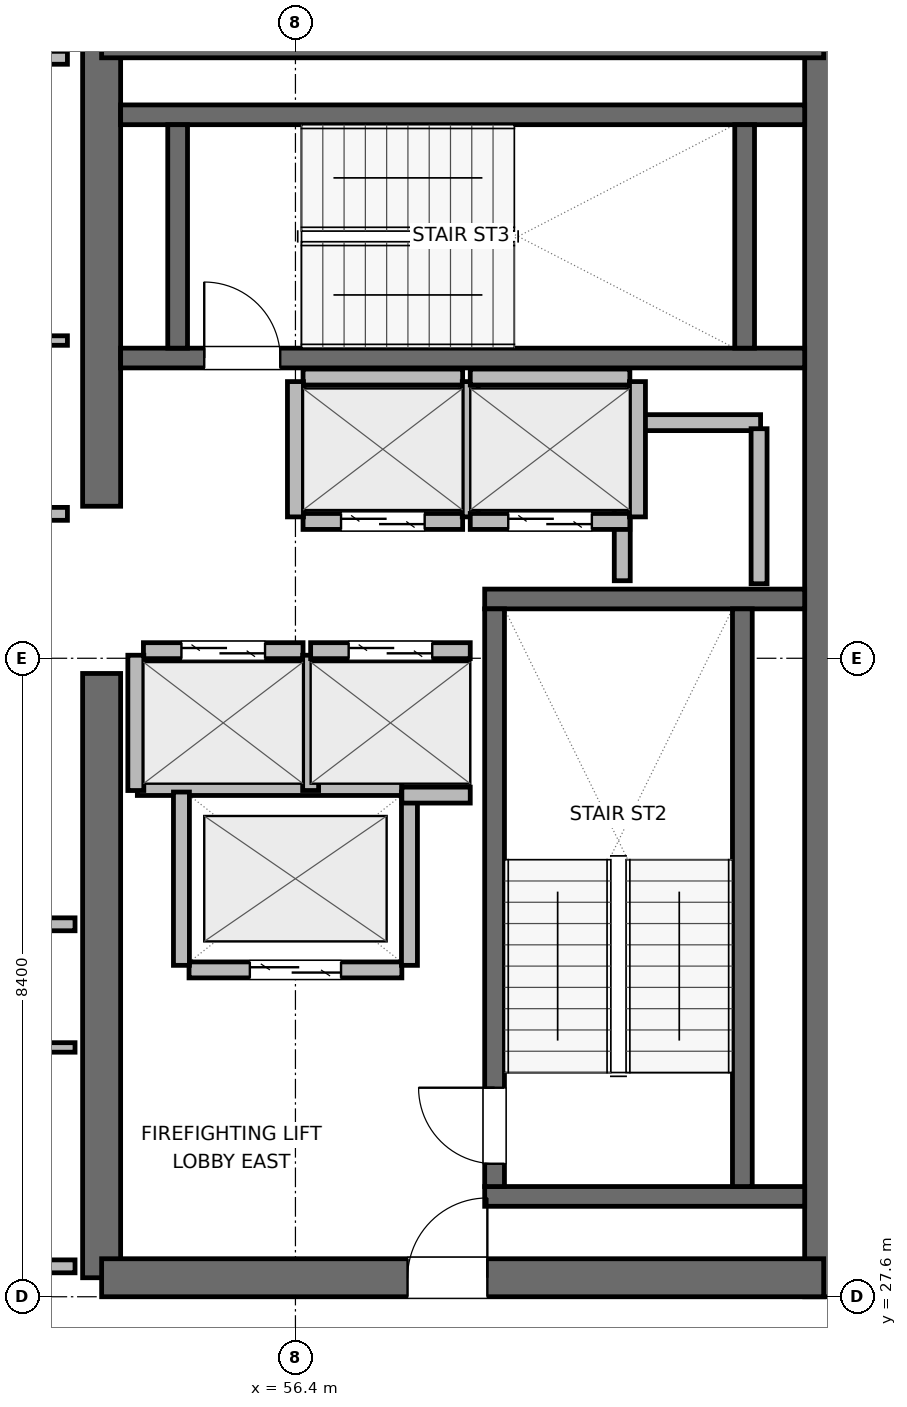
"""IFC4 building model, lengths in metres.
Left out: names, types, materials, properties, quantities, classifications, styles, units other than length and angle.
Written with IfcOpenShell. Run it as: python <this file> out.ifc"""

import sys

from ifc_helpers import new_model, si_unit, direction, frame, frame_2d, origin, place, context, subcontext, project, spatial, rectangle, extrude, element, fill, save


model = new_model("IFC4")
c1 = context("Model", 3, precision=1e-05, world=origin(), true_north=direction((0.0, 1.0)))
c2 = subcontext(c1, "Body", "Model", "MODEL_VIEW")
j1 = project(units=[si_unit("LENGTHUNIT", "METRE"), si_unit("PLANEANGLEUNIT", "RADIAN")], contexts=[c1])
p1 = place(None, origin())
s1 = spatial("IfcSite", under=j1, at=p1, CompositionType="ELEMENT")
p2 = place(p1, origin())
s2 = spatial("IfcBuilding", under=s1, at=p2, CompositionType="ELEMENT")
p3 = place(p2, frame((0.0, 0.0, 325.8)))
s3 = spatial("IfcBuildingStorey", under=s2, at=p3, CompositionType="ELEMENT", Elevation=325.8)
p4 = place(p3, frame((53.85, 27.85, 0.0), z_axis=(0.0, 0.0, 1.0), x_axis=(0.0, 1.0, 0.0)))
e1 = element("IfcWall", 1, at=p4, inside=s3, PredefinedType="SHEAR", context=c2, shape_type="SweptSolid", body=[
    extrude(rectangle(XDim=7.95, YDim=0.5, at=frame_2d((3.975, 0.0))), origin(), (0.0, 0.0, 1.0), 3.9),
])
p5 = place(p3, frame((53.85, 38.0, 0.0), z_axis=(0.0, 0.0, 1.0), x_axis=(0.0, 1.0, 0.0)))
e2 = element("IfcWall", 2, at=p5, inside=s3, PredefinedType="SHEAR", context=c2, shape_type="SweptSolid", body=[
    extrude(rectangle(XDim=6.15, YDim=0.5, at=frame_2d((3.075, 0.0))), origin(), (0.0, 0.0, 1.0), 3.9),
])
p6 = place(p3, frame((63.35, 27.6, 0.0), z_axis=(0.0, 0.0, 1.0), x_axis=(0.0, 1.0, 0.0)))
e3 = element("IfcWall", 3, at=p6, inside=s3, PredefinedType="SHEAR", context=c2, shape_type="SweptSolid", body=[
    extrude(rectangle(XDim=16.8, YDim=0.5, at=frame_2d((8.4, 0.0))), origin(), (0.0, 0.0, 1.0), 3.9),
])
p7 = place(p3, frame((53.85, 27.85, 0.0), z_axis=(0.0, 0.0, 1.0), x_axis=(1.0, 0.0, 0.0)))
e4 = element("IfcWall", 4, at=p7, inside=s3, PredefinedType="SHEAR", context=c2, shape_type="SweptSolid", body=[
    extrude(rectangle(XDim=9.5, YDim=0.5, at=frame_2d((4.75, 0.0))), origin(), (0.0, 0.0, 1.0), 3.9),
])
p8 = place(p7, frame((4.025, 0.0, 0.0)))
e5 = element("IfcOpeningElement", 5, at=p8, cuts=e4, PredefinedType="OPENING", context=c2, shape_type="SweptSolid", body=[
    extrude(rectangle(XDim=1.05, YDim=2.04, at=frame_2d((0.525, 1.02))), frame((0.0, 0.26, 0.0), z_axis=(0.0, -1.0, 0.0), x_axis=(1.0, 0.0, 0.0)), (0.0, 0.0, 1.0), 0.52),
])
p9 = place(p3, frame((53.85, 44.15, 0.0), z_axis=(0.0, 0.0, 1.0), x_axis=(1.0, 0.0, 0.0)))
e6 = element("IfcWall", 6, at=p9, inside=s3, PredefinedType="SHEAR", context=c2, shape_type="SweptSolid", body=[
    extrude(rectangle(XDim=9.5, YDim=0.5, at=frame_2d((4.75, 0.0))), origin(), (0.0, 0.0, 1.0), 3.9),
])
for number, where, z_axis, x_axis in (
    (7, (58.89, 28.92, 0.0), (0.0, 0.0, 1.0), (1.0, 0.0, 0.0)),
    (8, (58.89, 36.78, 0.0), (0.0, 0.0, 1.0), (1.0, 0.0, 0.0)),
):
    element("IfcWall", number, at=place(p3, frame(where, z_axis=z_axis, x_axis=x_axis)), inside=s3, PredefinedType="SHEAR", context=c2, shape_type="SweptSolid", body=[
        extrude(rectangle(XDim=4.21, YDim=0.26, at=frame_2d((2.105, 0.0))), origin(), (0.0, 0.0, 1.0), 3.9),
    ])
p10 = place(p3, frame((59.02, 29.05, 0.0), z_axis=(0.0, 0.0, 1.0), x_axis=(0.0, 1.0, 0.0)))
e9 = element("IfcWall", 9, at=p10, inside=s3, PredefinedType="SHEAR", context=c2, shape_type="SweptSolid", body=[
    extrude(rectangle(XDim=7.6, YDim=0.26, at=frame_2d((3.8, 0.0))), origin(), (0.0, 0.0, 1.0), 3.9),
])
p11 = place(p10, frame((0.3, 0.0, 0.0)))
e10 = element("IfcOpeningElement", 10, at=p11, cuts=e9, PredefinedType="OPENING", context=c2, shape_type="SweptSolid", body=[
    extrude(rectangle(XDim=1.0, YDim=2.04, at=frame_2d((0.5, 1.02))), frame((0.0, 0.14, 0.0), z_axis=(0.0, -1.0, 0.0), x_axis=(1.0, 0.0, 0.0)), (0.0, 0.0, 1.0), 0.28),
])
p12 = place(p3, frame((62.28, 29.05, 0.0), z_axis=(0.0, 0.0, 1.0), x_axis=(0.0, 1.0, 0.0)))
e11 = element("IfcWall", 11, at=p12, inside=s3, PredefinedType="SHEAR", context=c2, shape_type="SweptSolid", body=[
    extrude(rectangle(XDim=7.6, YDim=0.26, at=frame_2d((3.8, 0.0))), origin(), (0.0, 0.0, 1.0), 3.9),
])
p13 = place(p3, frame((54.1, 39.95, 0.0), z_axis=(0.0, 0.0, 1.0), x_axis=(1.0, 0.0, 0.0)))
e12 = element("IfcWall", 12, at=p13, inside=s3, PredefinedType="SHEAR", context=c2, shape_type="SweptSolid", body=[
    extrude(rectangle(XDim=9.0, YDim=0.26, at=frame_2d((4.5, 0.0))), origin(), (0.0, 0.0, 1.0), 3.9),
])
p14 = place(p13, frame((1.1, 0.0, 0.0)))
e13 = element("IfcOpeningElement", 13, at=p14, cuts=e12, PredefinedType="OPENING", context=c2, shape_type="SweptSolid", body=[
    extrude(rectangle(XDim=1.0, YDim=2.04, at=frame_2d((0.5, 1.02))), frame((0.0, 0.14, 0.0), z_axis=(0.0, -1.0, 0.0), x_axis=(1.0, 0.0, 0.0)), (0.0, 0.0, 1.0), 0.28),
])
p15 = place(p3, frame((54.1, 43.15, 0.0), z_axis=(0.0, 0.0, 1.0), x_axis=(1.0, 0.0, 0.0)))
e14 = element("IfcWall", 14, at=p15, inside=s3, PredefinedType="SHEAR", context=c2, shape_type="SweptSolid", body=[
    extrude(rectangle(XDim=9.0, YDim=0.26, at=frame_2d((4.5, 0.0))), origin(), (0.0, 0.0, 1.0), 3.9),
])
for number, where, z_axis, x_axis in (
    (15, (54.85, 40.08, 0.0), (0.0, 0.0, 1.0), (0.0, 1.0, 0.0)),
    (16, (62.31, 40.08, 0.0), (0.0, 0.0, 1.0), (0.0, 1.0, 0.0)),
):
    element("IfcWall", number, at=place(p3, frame(where, z_axis=z_axis, x_axis=x_axis)), inside=s3, PredefinedType="SHEAR", context=c2, shape_type="SweptSolid", body=[
        extrude(rectangle(XDim=2.94, YDim=0.26, at=frame_2d((1.47, 0.0))), origin(), (0.0, 0.0, 1.0), 3.9),
    ])
p16 = place(p3, frame((60.72, 39.1, 0.0), z_axis=(0.0, 0.0, 1.0), x_axis=(1.0, 0.0, 0.0)))
e17 = element("IfcWall", 17, at=p16, inside=s3, PredefinedType="PARTITIONING", context=c2, shape_type="SweptSolid", body=[
    extrude(rectangle(XDim=1.8, YDim=0.21, at=frame_2d((0.9, 0.0))), origin(), (0.0, 0.0, 1.0), 3.68),
])
p17 = place(p3, frame((60.7, 37.02, 0.0), z_axis=(0.0, 0.0, 1.0), x_axis=(0.0, 1.0, 0.0)))
e18 = element("IfcWall", 18, at=p17, inside=s3, PredefinedType="PARTITIONING", context=c2, shape_type="SweptSolid", body=[
    extrude(rectangle(XDim=1.96, YDim=0.21, at=frame_2d((0.98, 0.0))), origin(), (0.0, 0.0, 1.0), 3.68),
])
p18 = place(p3, frame((62.5, 36.98, 0.0), z_axis=(0.0, 0.0, 1.0), x_axis=(0.0, 1.0, 0.0)))
e19 = element("IfcWall", 19, at=p18, inside=s3, PredefinedType="PARTITIONING", context=c2, shape_type="SweptSolid", body=[
    extrude(rectangle(XDim=2.04, YDim=0.21, at=frame_2d((1.02, 0.0))), origin(), (0.0, 0.0, 1.0), 3.68),
])
p19 = place(p3, frame((55.0, 31.9, 0.0), z_axis=(0.0, 0.0, 1.0), x_axis=(1.0, 0.0, 0.0)))
e20 = element("IfcWall", 20, at=p19, inside=s3, PredefinedType="PARTITIONING", context=c2, shape_type="SweptSolid", body=[
    extrude(rectangle(XDim=2.8, YDim=0.21, at=frame_2d((1.4, 0.0))), origin(), (0.0, 0.0, 1.0), 3.68),
])
p20 = place(p19, frame((0.8, 0.0, 0.0)))
e21 = element("IfcOpeningElement", 21, at=p20, cuts=e20, PredefinedType="OPENING", context=c2, shape_type="SweptSolid", body=[
    extrude(rectangle(XDim=1.2, YDim=2.04, at=frame_2d((0.6, 1.02))), frame((0.0, 0.115, 0.0), z_axis=(0.0, -1.0, 0.0), x_axis=(1.0, 0.0, 0.0)), (0.0, 0.0, 1.0), 0.23),
])
p21 = place(p3, frame((54.32, 34.3, 0.0), z_axis=(0.0, 0.0, 1.0), x_axis=(1.0, 0.0, 0.0)))
e22 = element("IfcWall", 22, at=p21, inside=s3, PredefinedType="PARTITIONING", context=c2, shape_type="SweptSolid", body=[
    extrude(rectangle(XDim=3.48, YDim=0.21, at=frame_2d((1.74, 0.0))), origin(), (0.0, 0.0, 1.0), 3.68),
])
for number, where, z_axis, x_axis in (
    (23, (54.9, 31.96, 0.0), (0.0, 0.0, 1.0), (0.0, 1.0, 0.0)),
    (24, (57.9, 31.96, 0.0), (0.0, 0.0, 1.0), (0.0, 1.0, 0.0)),
):
    element("IfcWall", number, at=place(p3, frame(where, z_axis=z_axis, x_axis=x_axis)), inside=s3, PredefinedType="PARTITIONING", context=c2, shape_type="SweptSolid", body=[
        extrude(rectangle(XDim=2.28, YDim=0.21, at=frame_2d((1.14, 0.0))), origin(), (0.0, 0.0, 1.0), 3.68),
    ])
p22 = place(p3, frame((54.4, 36.1, 0.0), z_axis=(0.0, 0.0, 1.0), x_axis=(1.0, 0.0, 0.0)))
e25 = element("IfcWall", 25, at=p22, inside=s3, PredefinedType="PARTITIONING", context=c2, shape_type="SweptSolid", body=[
    extrude(rectangle(XDim=2.1, YDim=0.21, at=frame_2d((1.05, 0.0))), origin(), (0.0, 0.0, 1.0), 3.68),
])
p23 = place(p22, frame((0.5, 0.0, 0.0)))
e26 = element("IfcOpeningElement", 26, at=p23, cuts=e25, PredefinedType="OPENING", context=c2, shape_type="SweptSolid", body=[
    extrude(rectangle(XDim=1.1, YDim=2.04, at=frame_2d((0.55, 1.02))), frame((0.0, 0.115, 0.0), z_axis=(0.0, -1.0, 0.0), x_axis=(1.0, 0.0, 0.0)), (0.0, 0.0, 1.0), 0.23),
])
for number, where, z_axis, x_axis in (
    (27, (54.3, 34.26, 0.0), (0.0, 0.0, 1.0), (0.0, 1.0, 0.0)),
    (28, (56.6, 34.26, 0.0), (0.0, 0.0, 1.0), (0.0, 1.0, 0.0)),
):
    element("IfcWall", number, at=place(p3, frame(where, z_axis=z_axis, x_axis=x_axis)), inside=s3, PredefinedType="PARTITIONING", context=c2, shape_type="SweptSolid", body=[
        extrude(rectangle(XDim=1.78, YDim=0.21, at=frame_2d((0.89, 0.0))), origin(), (0.0, 0.0, 1.0), 3.68),
    ])
p24 = place(p3, frame((56.6, 36.1, 0.0), z_axis=(0.0, 0.0, 1.0), x_axis=(1.0, 0.0, 0.0)))
e29 = element("IfcWall", 29, at=p24, inside=s3, PredefinedType="PARTITIONING", context=c2, shape_type="SweptSolid", body=[
    extrude(rectangle(XDim=2.1, YDim=0.21, at=frame_2d((1.05, 0.0))), origin(), (0.0, 0.0, 1.0), 3.68),
])
p25 = place(p24, frame((0.5, 0.0, 0.0)))
e30 = element("IfcOpeningElement", 30, at=p25, cuts=e29, PredefinedType="OPENING", context=c2, shape_type="SweptSolid", body=[
    extrude(rectangle(XDim=1.1, YDim=2.04, at=frame_2d((0.55, 1.02))), frame((0.0, 0.115, 0.0), z_axis=(0.0, -1.0, 0.0), x_axis=(1.0, 0.0, 0.0)), (0.0, 0.0, 1.0), 0.23),
])
p26 = place(p3, frame((57.8, 34.2, 0.0), z_axis=(0.0, 0.0, 1.0), x_axis=(1.0, 0.0, 0.0)))
e31 = element("IfcWall", 31, at=p26, inside=s3, PredefinedType="PARTITIONING", context=c2, shape_type="SweptSolid", body=[
    extrude(rectangle(XDim=0.9, YDim=0.21, at=frame_2d((0.45, 0.0))), origin(), (0.0, 0.0, 1.0), 3.68),
])
p27 = place(p3, frame((56.5, 37.8, 0.0), z_axis=(0.0, 0.0, 1.0), x_axis=(1.0, 0.0, 0.0)))
e32 = element("IfcWall", 32, at=p27, inside=s3, PredefinedType="PARTITIONING", context=c2, shape_type="SweptSolid", body=[
    extrude(rectangle(XDim=2.1, YDim=0.21, at=frame_2d((1.05, 0.0))), origin(), (0.0, 0.0, 1.0), 3.68),
])
p28 = place(p27, frame((0.5, 0.0, 0.0)))
e33 = element("IfcOpeningElement", 33, at=p28, cuts=e32, PredefinedType="OPENING", context=c2, shape_type="SweptSolid", body=[
    extrude(rectangle(XDim=1.1, YDim=2.04, at=frame_2d((0.55, 1.02))), frame((0.0, 0.115, 0.0), z_axis=(0.0, -1.0, 0.0), x_axis=(1.0, 0.0, 0.0)), (0.0, 0.0, 1.0), 0.23),
])
p29 = place(p3, frame((56.5, 39.7, 0.0), z_axis=(0.0, 0.0, 1.0), x_axis=(1.0, 0.0, 0.0)))
e34 = element("IfcWall", 34, at=p29, inside=s3, PredefinedType="PARTITIONING", context=c2, shape_type="SweptSolid", body=[
    extrude(rectangle(XDim=2.1, YDim=0.21, at=frame_2d((1.05, 0.0))), origin(), (0.0, 0.0, 1.0), 3.68),
])
for number, where, z_axis, x_axis in (
    (35, (56.4, 37.86, 0.0), (0.0, 0.0, 1.0), (0.0, 1.0, 0.0)),
    (36, (58.7, 37.86, 0.0), (0.0, 0.0, 1.0), (0.0, 1.0, 0.0)),
):
    element("IfcWall", number, at=place(p3, frame(where, z_axis=z_axis, x_axis=x_axis)), inside=s3, PredefinedType="PARTITIONING", context=c2, shape_type="SweptSolid", body=[
        extrude(rectangle(XDim=1.78, YDim=0.21, at=frame_2d((0.89, 0.0))), origin(), (0.0, 0.0, 1.0), 3.68),
    ])
p30 = place(p3, frame((58.7, 37.8, 0.0), z_axis=(0.0, 0.0, 1.0), x_axis=(1.0, 0.0, 0.0)))
e37 = element("IfcWall", 37, at=p30, inside=s3, PredefinedType="PARTITIONING", context=c2, shape_type="SweptSolid", body=[
    extrude(rectangle(XDim=2.1, YDim=0.21, at=frame_2d((1.05, 0.0))), origin(), (0.0, 0.0, 1.0), 3.68),
])
p31 = place(p30, frame((0.5, 0.0, 0.0)))
e38 = element("IfcOpeningElement", 38, at=p31, cuts=e37, PredefinedType="OPENING", context=c2, shape_type="SweptSolid", body=[
    extrude(rectangle(XDim=1.1, YDim=2.04, at=frame_2d((0.55, 1.02))), frame((0.0, 0.115, 0.0), z_axis=(0.0, -1.0, 0.0), x_axis=(1.0, 0.0, 0.0)), (0.0, 0.0, 1.0), 0.23),
])
p32 = place(p3, frame((58.7, 39.7, 0.0), z_axis=(0.0, 0.0, 1.0), x_axis=(1.0, 0.0, 0.0)))
e39 = element("IfcWall", 39, at=p32, inside=s3, PredefinedType="PARTITIONING", context=c2, shape_type="SweptSolid", body=[
    extrude(rectangle(XDim=2.1, YDim=0.21, at=frame_2d((1.05, 0.0))), origin(), (0.0, 0.0, 1.0), 3.68),
])
p33 = place(p3, frame((60.9, 37.86, 0.0), z_axis=(0.0, 0.0, 1.0), x_axis=(0.0, 1.0, 0.0)))
e40 = element("IfcWall", 40, at=p33, inside=s3, PredefinedType="PARTITIONING", context=c2, shape_type="SweptSolid", body=[
    extrude(rectangle(XDim=1.78, YDim=0.21, at=frame_2d((0.89, 0.0))), origin(), (0.0, 0.0, 1.0), 3.68),
])
p34 = place(p3, frame((49.287, 28.0, 0.0), z_axis=(0.0, 0.0, 1.0), x_axis=(1.0, 0.0, 0.0)))
e41 = element("IfcWall", 41, at=p34, inside=s3, PredefinedType="PARTITIONING", context=c2, shape_type="SweptSolid", body=[
    extrude(rectangle(XDim=4.213, YDim=0.17, at=frame_2d((2.106, 0.0))), origin(), (0.0, 0.0, 1.0), 2.765),
])
p35 = place(p3, frame((52.2, 32.5, 0.0), z_axis=(0.0, 0.0, 1.0), x_axis=(1.0, 0.0, 0.0)))
e42 = element("IfcWall", 42, at=p35, inside=s3, PredefinedType="PARTITIONING", context=c2, shape_type="SweptSolid", body=[
    extrude(rectangle(XDim=1.3, YDim=0.17, at=frame_2d((0.65, 0.0))), origin(), (0.0, 0.0, 1.0), 3.68),
])
p36 = place(p3, frame((49.287, 30.88, 0.0), z_axis=(0.0, 0.0, 1.0), x_axis=(1.0, 0.0, 0.0)))
e43 = element("IfcWall", 43, at=p36, inside=s3, PredefinedType="PARTITIONING", context=c2, shape_type="SweptSolid", body=[
    extrude(rectangle(XDim=4.213, YDim=0.125, at=frame_2d((2.106, 0.0))), origin(), (0.0, 0.0, 1.0), 3.68),
])
p37 = place(p3, frame((49.287, 37.9, 0.0), z_axis=(0.0, 0.0, 1.0), x_axis=(1.0, 0.0, 0.0)))
e44 = element("IfcWall", 44, at=p37, inside=s3, PredefinedType="PARTITIONING", context=c2, shape_type="SweptSolid", body=[
    extrude(rectangle(XDim=4.113, YDim=0.17, at=frame_2d((2.056, 0.0))), origin(), (0.0, 0.0, 1.0), 3.68),
])
p38 = place(p3, frame((49.287, 43.9, 0.0), z_axis=(0.0, 0.0, 1.0), x_axis=(1.0, 0.0, 0.0)))
e45 = element("IfcWall", 45, at=p38, inside=s3, PredefinedType="PARTITIONING", context=c2, shape_type="SweptSolid", body=[
    extrude(rectangle(XDim=4.113, YDim=0.17, at=frame_2d((2.056, 0.0))), origin(), (0.0, 0.0, 1.0), 2.765),
])
p39 = place(p3, frame((49.287, 40.18, 0.0), z_axis=(0.0, 0.0, 1.0), x_axis=(1.0, 0.0, 0.0)))
e46 = element("IfcWall", 46, at=p39, inside=s3, PredefinedType="PARTITIONING", context=c2, shape_type="SweptSolid", body=[
    extrude(rectangle(XDim=4.113, YDim=0.125, at=frame_2d((2.056, 0.0))), origin(), (0.0, 0.0, 1.0), 3.68),
])
p40 = place(p11, origin())
e47 = element("IfcDoor", 47, at=p40, inside=s3, OperationType="SINGLE_SWING_RIGHT", PredefinedType="DOOR", context=c2, shape_type="SweptSolid", body=[
    extrude(rectangle(XDim=1.0, YDim=2.04, at=frame_2d((0.5, 1.02))), frame((0.0, 0.025, 0.0), z_axis=(0.0, -1.0, 0.0), x_axis=(1.0, 0.0, 0.0)), (0.0, 0.0, 1.0), 0.05),
])
fill(e10, e47)
p41 = place(p14, origin())
e48 = element("IfcDoor", 48, at=p41, inside=s3, OperationType="SINGLE_SWING_LEFT", PredefinedType="DOOR", context=c2, shape_type="SweptSolid", body=[
    extrude(rectangle(XDim=1.0, YDim=2.04, at=frame_2d((0.5, 1.02))), frame((0.0, 0.025, 0.0), z_axis=(0.0, -1.0, 0.0), x_axis=(1.0, 0.0, 0.0)), (0.0, 0.0, 1.0), 0.05),
])
fill(e13, e48)
p42 = place(p20, origin())
e49 = element("IfcDoor", 49, at=p42, inside=s3, OperationType="DOUBLE_DOOR_SLIDING", PredefinedType="DOOR", context=c2, shape_type="SweptSolid", body=[
    extrude(rectangle(XDim=1.2, YDim=2.04, at=frame_2d((0.6, 1.02))), frame((0.0, 0.025, 0.0), z_axis=(0.0, -1.0, 0.0), x_axis=(1.0, 0.0, 0.0)), (0.0, 0.0, 1.0), 0.05),
])
fill(e21, e49)
p43 = place(p23, origin())
e50 = element("IfcDoor", 50, at=p43, inside=s3, OperationType="DOUBLE_DOOR_SLIDING", PredefinedType="DOOR", context=c2, shape_type="SweptSolid", body=[
    extrude(rectangle(XDim=1.1, YDim=2.04, at=frame_2d((0.55, 1.02))), frame((0.0, 0.025, 0.0), z_axis=(0.0, -1.0, 0.0), x_axis=(1.0, 0.0, 0.0)), (0.0, 0.0, 1.0), 0.05),
])
fill(e26, e50)
p44 = place(p25, origin())
e51 = element("IfcDoor", 51, at=p44, inside=s3, OperationType="DOUBLE_DOOR_SLIDING", PredefinedType="DOOR", context=c2, shape_type="SweptSolid", body=[
    extrude(rectangle(XDim=1.1, YDim=2.04, at=frame_2d((0.55, 1.02))), frame((0.0, 0.025, 0.0), z_axis=(0.0, -1.0, 0.0), x_axis=(1.0, 0.0, 0.0)), (0.0, 0.0, 1.0), 0.05),
])
fill(e30, e51)
p45 = place(p28, origin())
e52 = element("IfcDoor", 52, at=p45, inside=s3, OperationType="DOUBLE_DOOR_SLIDING", PredefinedType="DOOR", context=c2, shape_type="SweptSolid", body=[
    extrude(rectangle(XDim=1.1, YDim=2.04, at=frame_2d((0.55, 1.02))), frame((0.0, 0.025, 0.0), z_axis=(0.0, -1.0, 0.0), x_axis=(1.0, 0.0, 0.0)), (0.0, 0.0, 1.0), 0.05),
])
fill(e33, e52)
p46 = place(p31, origin())
e53 = element("IfcDoor", 53, at=p46, inside=s3, OperationType="DOUBLE_DOOR_SLIDING", PredefinedType="DOOR", context=c2, shape_type="SweptSolid", body=[
    extrude(rectangle(XDim=1.1, YDim=2.04, at=frame_2d((0.55, 1.02))), frame((0.0, 0.025, 0.0), z_axis=(0.0, -1.0, 0.0), x_axis=(1.0, 0.0, 0.0)), (0.0, 0.0, 1.0), 0.05),
])
fill(e38, e53)
p47 = place(p8, origin())
e54 = element("IfcDoor", 54, at=p47, inside=s3, OperationType="SINGLE_SWING_RIGHT", PredefinedType="DOOR", context=c2, shape_type="SweptSolid", body=[
    extrude(rectangle(XDim=1.05, YDim=2.04, at=frame_2d((0.525, 1.02))), frame((0.0, 0.025, 0.0), z_axis=(0.0, -1.0, 0.0), x_axis=(1.0, 0.0, 0.0)), (0.0, 0.0, 1.0), 0.05),
])
fill(e5, e54)
save(model, sys.argv[1])
